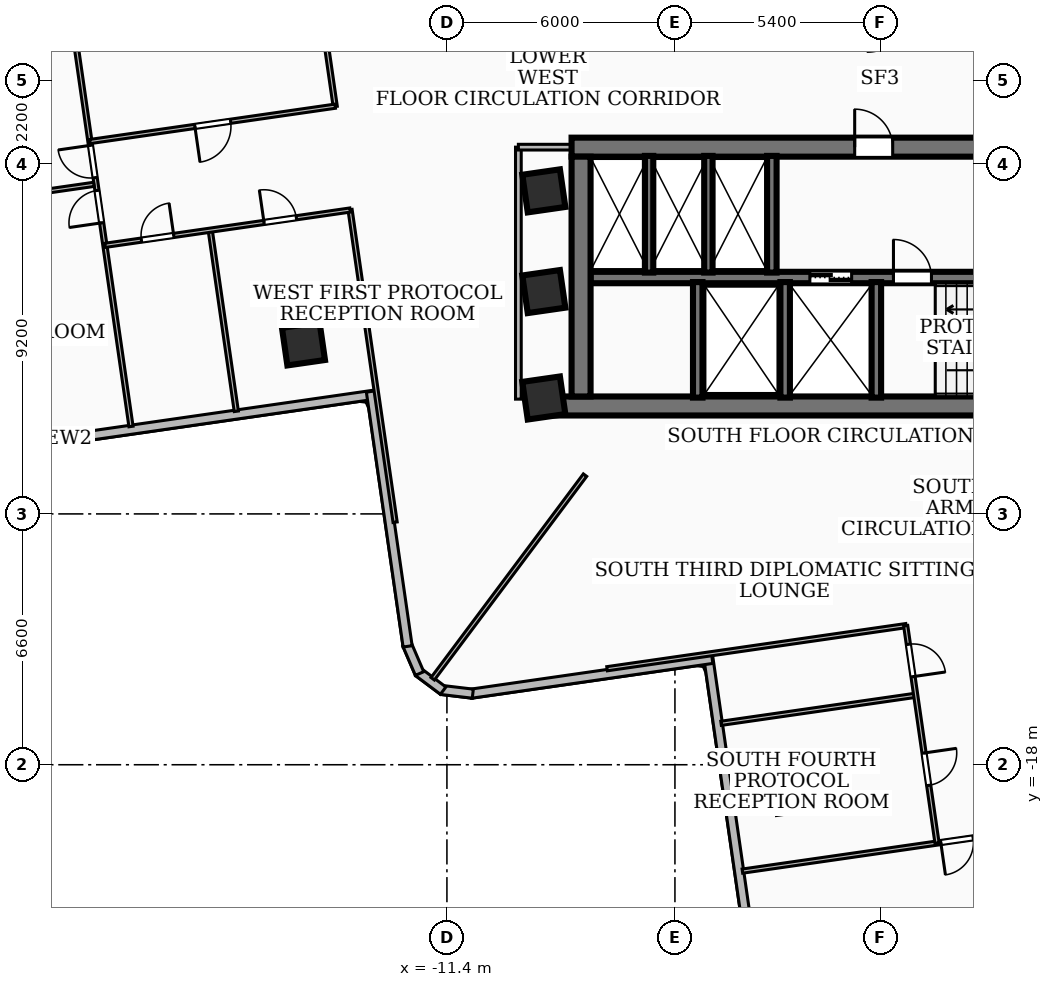
"""IFC4 building model, lengths in metres.
Left out: names, types, materials, properties, quantities, classifications, styles, units other than length and angle.
Written with IfcOpenShell. Run it as: python <this file> out.ifc"""

import sys

from ifc_helpers import new_model, si_unit, direction, frame, frame_2d, origin, origin_2d, place, context, subcontext, project, spatial, rectangle, extrude, element, fill, save


model = new_model("IFC4")
c1 = context("Model", 3, precision=1e-05, world=origin(), true_north=direction((0.0, 1.0)))
c2 = subcontext(c1, "Body", "Model", "MODEL_VIEW")
j1 = project(units=[si_unit("LENGTHUNIT", "METRE"), si_unit("PLANEANGLEUNIT", "RADIAN")], contexts=[c1])
p1 = place(None, origin())
s1 = spatial("IfcSite", under=j1, at=p1, CompositionType="ELEMENT")
p2 = place(p1, origin())
s2 = spatial("IfcBuilding", under=s1, at=p2, CompositionType="ELEMENT")
p3 = place(p2, frame((0.0, 0.0, 89.28)))
s3 = spatial("IfcBuildingStorey", under=s2, at=p3, CompositionType="ELEMENT", Elevation=89.28)
p4 = place(p3, frame((8.78, -8.56, 0.0), z_axis=(0.0, 0.0, 1.0), x_axis=(-1.0, 0.0, 0.0)))
e1 = element("IfcWall", 1, at=p4, inside=s3, PredefinedType="SHEAR", context=c2, shape_type="SweptSolid", body=[
    extrude(rectangle(XDim=17.56, YDim=0.5, at=frame_2d((8.78, 0.0))), origin(), (0.0, 0.0, 1.0), 3.34),
])
p5 = place(p3, frame((-8.12, -1.75, 0.0), z_axis=(0.0, 0.0, 1.0), x_axis=(1.0, 0.0, 0.0)))
e2 = element("IfcWall", 2, at=p5, inside=s3, PredefinedType="SHEAR", context=c2, shape_type="SweptSolid", body=[
    extrude(rectangle(XDim=16.24, YDim=0.5, at=frame_2d((8.12, 0.0))), origin(), (0.0, 0.0, 1.0), 3.34),
])
p6 = place(p5, frame((7.45, 0.0, 0.0)))
e3 = element("IfcOpeningElement", 3, at=p6, cuts=e2, PredefinedType="OPENING", context=c2, shape_type="SweptSolid", body=[
    extrude(rectangle(XDim=1.0, YDim=2.1, at=frame_2d((0.5, 1.05))), frame((0.0, 0.26, 0.0), z_axis=(0.0, -1.0, 0.0), x_axis=(1.0, 0.0, 0.0)), (0.0, 0.0, 1.0), 0.52),
])
p7 = place(p5, frame((10.965, 0.0, 0.0)))
e4 = element("IfcOpeningElement", 4, at=p7, cuts=e2, PredefinedType="OPENING", context=c2, shape_type="SweptSolid", body=[
    extrude(rectangle(XDim=1.05, YDim=2.15, at=frame_2d((0.525, 1.075))), frame((0.0, 0.26, 0.0), z_axis=(0.0, -1.0, 0.0), x_axis=(1.0, 0.0, 0.0)), (0.0, 0.0, 1.0), 0.52),
])
p8 = place(p5, frame((12.525, 0.0, 0.0)))
e5 = element("IfcOpeningElement", 5, at=p8, cuts=e2, PredefinedType="OPENING", context=c2, shape_type="SweptSolid", body=[
    extrude(rectangle(XDim=1.05, YDim=2.15, at=frame_2d((0.525, 1.075))), frame((0.0, 0.26, 0.0), z_axis=(0.0, -1.0, 0.0), x_axis=(1.0, 0.0, 0.0)), (0.0, 0.0, 1.0), 0.52),
])
p9 = place(p5, frame((14.085, 0.0, 0.0)))
e6 = element("IfcOpeningElement", 6, at=p9, cuts=e2, PredefinedType="OPENING", context=c2, shape_type="SweptSolid", body=[
    extrude(rectangle(XDim=1.05, YDim=2.15, at=frame_2d((0.525, 1.075))), frame((0.0, 0.26, 0.0), z_axis=(0.0, -1.0, 0.0), x_axis=(1.0, 0.0, 0.0)), (0.0, 0.0, 1.0), 0.52),
])
p10 = place(p3, frame((-7.87, -8.31, 0.0), z_axis=(0.0, 0.0, 1.0), x_axis=(0.0, 1.0, 0.0)))
e7 = element("IfcWall", 7, at=p10, inside=s3, PredefinedType="SHEAR", context=c2, shape_type="SweptSolid", body=[
    extrude(rectangle(XDim=6.31, YDim=0.5, at=frame_2d((3.155, 0.0))), origin(), (0.0, 0.0, 1.0), 3.34),
])
p11 = place(p3, frame((-7.62, -5.18, 0.0), z_axis=(0.0, 0.0, 1.0), x_axis=(1.0, 0.0, 0.0)))
e8 = element("IfcWall", 8, at=p11, inside=s3, PredefinedType="SOLIDWALL", context=c2, shape_type="SweptSolid", body=[
    extrude(rectangle(XDim=15.24, YDim=0.3, at=frame_2d((7.62, 0.0))), origin(), (0.0, 0.0, 1.0), 3.34),
])
p12 = place(p11, frame((5.77, 0.0, 0.0)))
e9 = element("IfcOpeningElement", 9, at=p12, cuts=e8, PredefinedType="OPENING", context=c2, shape_type="SweptSolid", body=[
    extrude(rectangle(XDim=1.1, YDim=2.15, at=frame_2d((0.55, 1.075))), frame((0.0, 0.16, 0.0), z_axis=(0.0, -1.0, 0.0), x_axis=(1.0, 0.0, 0.0)), (0.0, 0.0, 1.0), 0.32),
])
p13 = place(p11, frame((7.97, 0.0, 0.0)))
e10 = element("IfcOpeningElement", 10, at=p13, cuts=e8, PredefinedType="OPENING", context=c2, shape_type="SweptSolid", body=[
    extrude(rectangle(XDim=1.0, YDim=2.1, at=frame_2d((0.5, 1.05))), frame((0.0, 0.16, 0.0), z_axis=(0.0, -1.0, 0.0), x_axis=(1.0, 0.0, 0.0)), (0.0, 0.0, 1.0), 0.32),
])
for number, where, z_axis, x_axis in (
    (11, (-0.1, -8.34, 0.0), (0.0, 0.0, 1.0), (0.0, 1.0, 0.0)),
    (12, (-2.5, -8.34, 0.0), (0.0, 0.0, 1.0), (0.0, 1.0, 0.0)),
    (13, (-4.8, -8.34, 0.0), (0.0, 0.0, 1.0), (0.0, 1.0, 0.0)),
):
    element("IfcWall", number, at=place(p3, frame(where, z_axis=z_axis, x_axis=x_axis)), inside=s3, PredefinedType="SOLIDWALL", context=c2, shape_type="SweptSolid", body=[
        extrude(rectangle(XDim=3.04, YDim=0.25, at=frame_2d((1.52, 0.0))), origin(), (0.0, 0.0, 1.0), 3.34),
    ])
p14 = place(p3, frame((-2.85, -5.05, 0.0), z_axis=(0.0, 0.0, 1.0), x_axis=(0.0, 1.0, 0.0)))
e14 = element("IfcWall", 14, at=p14, inside=s3, PredefinedType="SOLIDWALL", context=c2, shape_type="SweptSolid", body=[
    extrude(rectangle(XDim=3.07, YDim=0.25, at=frame_2d((1.535, 0.0))), origin(), (0.0, 0.0, 1.0), 3.34),
])
for number, where, z_axis, x_axis in (
    (15, (-6.08, -5.05, 0.0), (0.0, 0.0, 1.0), (0.0, 1.0, 0.0)),
    (16, (-4.52, -5.05, 0.0), (0.0, 0.0, 1.0), (0.0, 1.0, 0.0)),
):
    element("IfcWall", number, at=place(p3, frame(where, z_axis=z_axis, x_axis=x_axis)), inside=s3, PredefinedType="SOLIDWALL", context=c2, shape_type="SweptSolid", body=[
        extrude(rectangle(XDim=3.07, YDim=0.22, at=frame_2d((1.535, 0.0))), origin(), (0.0, 0.0, 1.0), 3.34),
    ])
for number, where, z_axis, x_axis in (
    (17, (-8.85, -5.55, 0.0), (0.0, 0.0, 1.0), (0.99, 0.143, 0.0)),
    (18, (-8.85, -2.9, 0.0), (0.0, 0.0, 1.0), (0.99, 0.143, 0.0)),
    (19, (-8.85, -8.35, 0.0), (0.0, 0.0, 1.0), (0.99, 0.143, 0.0)),
    (20, (-15.175, -6.927, 0.0), (0.0, 0.0, 1.0), (0.99, 0.143, 0.0)),
    (21, (-2.271, -18.724, 0.0), (0.0, 0.0, 1.0), (0.99, 0.143, 0.0)),
):
    element("IfcColumn", number, at=place(p3, frame(where, z_axis=z_axis, x_axis=x_axis)), inside=s3, PredefinedType="COLUMN", context=c2, shape_type="SweptSolid", body=[
        extrude(rectangle(XDim=1.0, YDim=1.0, at=origin_2d()), origin(), (0.0, 0.0, 1.0), 3.6),
    ])
p15 = place(p3, frame((-13.292, -8.26, 0.0), z_axis=(0.0, 0.0, 1.0), x_axis=(-0.989770197797, -0.142670794326, 0.0)))
e22 = element("IfcWall", 22, at=p15, inside=s3, PredefinedType="SOLIDWALL", context=c2, shape_type="SweptSolid", body=[
    extrude(rectangle(XDim=16.275, YDim=0.24, at=frame_2d((8.138, 0.0))), origin(), (0.0, 0.0, 1.0), 2.644),
])
p16 = place(p3, frame((-2.862, -26.691, 0.0), z_axis=(0.0, 0.0, 1.0), x_axis=(-0.142682889326, 0.989768454283, 0.0)))
e23 = element("IfcWall", 23, at=p16, inside=s3, PredefinedType="SOLIDWALL", context=c2, shape_type="SweptSolid", body=[
    extrude(rectangle(XDim=11.676, YDim=0.24, at=frame_2d((5.838, 0.0))), origin(), (0.0, 0.0, 1.0), 2.486),
])
p17 = place(p3, frame((-4.419, -15.215, 0.0), z_axis=(0.0, 0.0, 1.0), x_axis=(-0.989755260243, -0.14277438433, 0.0)))
e24 = element("IfcWall", 24, at=p17, inside=s3, PredefinedType="SOLIDWALL", context=c2, shape_type="SweptSolid", body=[
    extrude(rectangle(XDim=6.416, YDim=0.24, at=frame_2d((3.208, 0.0))), origin(), (0.0, 0.0, 1.0), 2.486),
])
p18 = place(p3, frame((-10.719, -16.13, 0.0), z_axis=(0.0, 0.0, 1.0), x_axis=(-0.993031739051, 0.117847211411, 0.0)))
e25 = element("IfcWall", 25, at=p18, inside=s3, PredefinedType="SOLIDWALL", context=c2, shape_type="SweptSolid", body=[
    extrude(rectangle(XDim=0.831, YDim=0.24, at=frame_2d((0.416, 0.0))), origin(), (0.0, 0.0, 1.0), 3.34),
])
p19 = place(p3, frame((-11.499, -16.05, 0.0), z_axis=(0.0, 0.0, 1.0), x_axis=(-0.800072018724, 0.599903963027, 0.0)))
e26 = element("IfcWall", 26, at=p19, inside=s3, PredefinedType="SOLIDWALL", context=c2, shape_type="SweptSolid", body=[
    extrude(rectangle(XDim=0.813, YDim=0.24, at=frame_2d((0.407, 0.0))), origin(), (0.0, 0.0, 1.0), 3.34),
])
p20 = place(p3, frame((-12.12, -15.6, 0.0), z_axis=(0.0, 0.0, 1.0), x_axis=(-0.394735025731, 0.918795004047, 0.0)))
e27 = element("IfcWall", 27, at=p20, inside=s3, PredefinedType="SOLIDWALL", context=c2, shape_type="SweptSolid", body=[
    extrude(rectangle(XDim=0.831, YDim=0.24, at=frame_2d((0.415, 0.0))), origin(), (0.0, 0.0, 1.0), 3.34),
])
p21 = place(p3, frame((-12.434, -14.885, 0.0), z_axis=(0.0, 0.0, 1.0), x_axis=(-0.142692500085, 0.989767068769, 0.0)))
e28 = element("IfcWall", 28, at=p21, inside=s3, PredefinedType="SOLIDWALL", context=c2, shape_type="SweptSolid", body=[
    extrude(rectangle(XDim=6.775, YDim=0.24, at=frame_2d((3.388, 0.0))), origin(), (0.0, 0.0, 1.0), 2.644),
])
p22 = place(p3, frame((-9.52, -8.38, 0.0), z_axis=(0.0, 0.0, 1.0), x_axis=(0.0, 1.0, 0.0)))
e29 = element("IfcWall", 29, at=p22, inside=s3, PredefinedType="PARTITIONING", context=c2, shape_type="SweptSolid", body=[
    extrude(rectangle(XDim=6.63, YDim=0.15, at=frame_2d((3.315, 0.0))), origin(), (0.0, 0.0, 1.0), 2.486),
])
p23 = place(p3, frame((-7.85, -1.75, 0.0), z_axis=(0.0, 0.0, 1.0), x_axis=(-1.0, 0.0, 0.0)))
e30 = element("IfcWall", 30, at=p23, inside=s3, PredefinedType="PARTITIONING", context=c2, shape_type="SweptSolid", body=[
    extrude(rectangle(XDim=1.67, YDim=0.15, at=frame_2d((0.835, 0.0))), origin(), (0.0, 0.0, 1.0), 2.405),
])
p24 = place(p3, frame((-7.766, -10.38, 0.0), z_axis=(0.0, 0.0, 1.0), x_axis=(-0.598966195252, -0.800774310867, 0.0)))
e31 = element("IfcWall", 31, at=p24, inside=s3, PredefinedType="PARTITIONING", context=c2, shape_type="SweptSolid", body=[
    extrude(rectangle(XDim=6.691, YDim=0.11, at=frame_2d((3.346, 0.0))), origin(), (0.0, 0.0, 1.0), 2.644),
])
p25 = place(p3, frame((-13.949, -3.394, 0.0), z_axis=(0.0, 0.0, 1.0), x_axis=(0.142725091033, -0.989762369657, 0.0)))
e32 = element("IfcWall", 32, at=p25, inside=s3, PredefinedType="PARTITIONING", context=c2, shape_type="SweptSolid", body=[
    extrude(rectangle(XDim=8.31, YDim=0.11, at=frame_2d((4.155, 0.0))), origin(), (0.0, 0.0, 1.0), 2.486),
])
p26 = place(p3, frame((-15.474, 7.186, 0.0), z_axis=(0.0, 0.0, 1.0), x_axis=(0.142779920322, -0.989754461648, 0.0)))
e33 = element("IfcWall", 33, at=p26, inside=s3, PredefinedType="PARTITIONING", context=c2, shape_type="SweptSolid", body=[
    extrude(rectangle(XDim=7.949, YDim=0.11, at=frame_2d((3.975, 0.0))), origin(), (0.0, 0.0, 1.0), 2.486),
])
p27 = place(p3, frame((-17.626, -3.954, 0.0), z_axis=(0.0, 0.0, 1.0), x_axis=(0.142668704072, -0.989770499095, 0.0)))
e34 = element("IfcWall", 34, at=p27, inside=s3, PredefinedType="PARTITIONING", context=c2, shape_type="SweptSolid", body=[
    extrude(rectangle(XDim=4.795, YDim=0.11, at=frame_2d((2.397, 0.0))), origin(), (0.0, 0.0, 1.0), 2.486),
])
p28 = place(p3, frame((-20.4, -4.334, 0.0), z_axis=(0.0, 0.0, 1.0), x_axis=(0.989774990044, 0.142637544439, 0.0)))
e35 = element("IfcWall", 35, at=p28, inside=s3, PredefinedType="PARTITIONING", context=c2, shape_type="SweptSolid", body=[
    extrude(rectangle(XDim=6.52, YDim=0.11, at=frame_2d((3.26, 0.0))), origin(), (0.0, 0.0, 1.0), 3.34),
])
p29 = place(p28, frame((4.23, 0.0, 0.0)))
e36 = element("IfcOpeningElement", 36, at=p29, cuts=e35, PredefinedType="OPENING", context=c2, shape_type="SweptSolid", body=[
    extrude(rectangle(XDim=0.86, YDim=2.04, at=frame_2d((0.43, 1.02))), frame((0.0, 0.065, 0.0), z_axis=(0.0, -1.0, 0.0), x_axis=(1.0, 0.0, 0.0)), (0.0, 0.0, 1.0), 0.13),
])
p30 = place(p28, frame((0.97, 0.0, 0.0)))
e37 = element("IfcOpeningElement", 37, at=p30, cuts=e35, PredefinedType="OPENING", context=c2, shape_type="SweptSolid", body=[
    extrude(rectangle(XDim=0.86, YDim=2.04, at=frame_2d((0.43, 1.02))), frame((0.0, 0.065, 0.0), z_axis=(0.0, -1.0, 0.0), x_axis=(1.0, 0.0, 0.0)), (0.0, 0.0, 1.0), 0.13),
])
p31 = place(p3, frame((-14.341, -0.672, 0.0), z_axis=(0.0, 0.0, 1.0), x_axis=(-0.989774990044, -0.142637544439, 0.0)))
e38 = element("IfcWall", 38, at=p31, inside=s3, PredefinedType="PARTITIONING", context=c2, shape_type="SweptSolid", body=[
    extrude(rectangle(XDim=6.52, YDim=0.11, at=frame_2d((3.26, 0.0))), origin(), (0.0, 0.0, 1.0), 3.34),
])
p32 = place(p31, frame((2.78, 0.0, 0.0)))
e39 = element("IfcOpeningElement", 39, at=p32, cuts=e38, PredefinedType="OPENING", context=c2, shape_type="SweptSolid", body=[
    extrude(rectangle(XDim=0.95, YDim=2.08, at=frame_2d((0.475, 1.04))), frame((0.0, 0.065, 0.0), z_axis=(0.0, -1.0, 0.0), x_axis=(1.0, 0.0, 0.0)), (0.0, 0.0, 1.0), 0.13),
])
p33 = place(p3, frame((-20.692, -2.729, 0.0), z_axis=(0.0, 0.0, 1.0), x_axis=(-0.989773607841, -0.14264713534, 0.0)))
e40 = element("IfcWall", 40, at=p33, inside=s3, PredefinedType="PARTITIONING", context=c2, shape_type="SweptSolid", body=[
    extrude(rectangle(XDim=11.125, YDim=0.11, at=frame_2d((5.562, 0.0))), origin(), (0.0, 0.0, 1.0), 2.832),
])
p34 = place(p3, frame((-19.713, -9.1, 0.0), z_axis=(0.0, 0.0, 1.0), x_axis=(-0.142667743944, 0.98977063749, 0.0)))
e41 = element("IfcWall", 41, at=p34, inside=s3, PredefinedType="PARTITIONING", context=c2, shape_type="SweptSolid", body=[
    extrude(rectangle(XDim=12.75, YDim=0.11, at=frame_2d((6.375, 0.0))), origin(), (0.0, 0.0, 1.0), 2.486),
])
p35 = place(p34, frame((6.615, 0.0, 0.0)))
e42 = element("IfcOpeningElement", 42, at=p35, cuts=e41, PredefinedType="OPENING", context=c2, shape_type="SweptSolid", body=[
    extrude(rectangle(XDim=0.86, YDim=2.04, at=frame_2d((0.43, 1.02))), frame((0.0, 0.065, 0.0), z_axis=(0.0, -1.0, 0.0), x_axis=(1.0, 0.0, 0.0)), (0.0, 0.0, 1.0), 0.13),
])
p36 = place(p34, frame((5.414, 0.0, 0.0)))
e43 = element("IfcOpeningElement", 43, at=p36, cuts=e41, PredefinedType="OPENING", context=c2, shape_type="SweptSolid", body=[
    extrude(rectangle(XDim=0.86, YDim=2.04, at=frame_2d((0.43, 1.02))), frame((0.0, 0.065, 0.0), z_axis=(0.0, -1.0, 0.0), x_axis=(1.0, 0.0, 0.0)), (0.0, 0.0, 1.0), 0.13),
])
p37 = place(p3, frame((-7.186, -15.474, 0.0), z_axis=(0.0, 0.0, 1.0), x_axis=(0.989754461648, 0.142779920322, 0.0)))
e44 = element("IfcWall", 44, at=p37, inside=s3, PredefinedType="PARTITIONING", context=c2, shape_type="SweptSolid", body=[
    extrude(rectangle(XDim=7.949, YDim=0.11, at=frame_2d((3.975, 0.0))), origin(), (0.0, 0.0, 1.0), 2.486),
])
p38 = place(p3, frame((-4.186, -16.91, 0.0), z_axis=(0.0, 0.0, 1.0), x_axis=(0.989785908973, 0.142561756436, 0.0)))
e45 = element("IfcWall", 45, at=p38, inside=s3, PredefinedType="PARTITIONING", context=c2, shape_type="SweptSolid", body=[
    extrude(rectangle(XDim=5.155, YDim=0.11, at=frame_2d((2.577, 0.0))), origin(), (0.0, 0.0, 1.0), 2.486),
])
p39 = place(p3, frame((0.672, -14.341, 0.0), z_axis=(0.0, 0.0, 1.0), x_axis=(0.142722164178, -0.989762791709, 0.0)))
e46 = element("IfcWall", 46, at=p39, inside=s3, PredefinedType="PARTITIONING", context=c2, shape_type="SweptSolid", body=[
    extrude(rectangle(XDim=5.78, YDim=0.11, at=frame_2d((2.89, 0.0))), origin(), (0.0, 0.0, 1.0), 3.34),
])
p40 = place(p39, frame((0.495, 0.0, 0.0)))
e47 = element("IfcOpeningElement", 47, at=p40, cuts=e46, PredefinedType="OPENING", context=c2, shape_type="SweptSolid", body=[
    extrude(rectangle(XDim=0.86, YDim=2.04, at=frame_2d((0.43, 1.02))), frame((0.0, 0.065, 0.0), z_axis=(0.0, -1.0, 0.0), x_axis=(1.0, 0.0, 0.0)), (0.0, 0.0, 1.0), 0.13),
])
p41 = place(p39, frame((3.385, 0.0, 0.0)))
e48 = element("IfcOpeningElement", 48, at=p41, cuts=e46, PredefinedType="OPENING", context=c2, shape_type="SweptSolid", body=[
    extrude(rectangle(XDim=0.86, YDim=2.04, at=frame_2d((0.43, 1.02))), frame((0.0, 0.065, 0.0), z_axis=(0.0, -1.0, 0.0), x_axis=(1.0, 0.0, 0.0)), (0.0, 0.0, 1.0), 0.13),
])
p42 = place(p3, frame((8.994, -18.981, 0.0), z_axis=(0.0, 0.0, 1.0), x_axis=(-0.989779502996, -0.14260622514, 0.0)))
e49 = element("IfcWall", 49, at=p42, inside=s3, PredefinedType="PARTITIONING", context=c2, shape_type="SweptSolid", body=[
    extrude(rectangle(XDim=12.749, YDim=0.11, at=frame_2d((6.375, 0.0))), origin(), (0.0, 0.0, 1.0), 2.486),
])
p43 = place(p42, frame((6.615, 0.0, 0.0)))
e50 = element("IfcOpeningElement", 50, at=p43, cuts=e49, PredefinedType="OPENING", context=c2, shape_type="SweptSolid", body=[
    extrude(rectangle(XDim=0.86, YDim=2.04, at=frame_2d((0.43, 1.02))), frame((0.0, 0.065, 0.0), z_axis=(0.0, -1.0, 0.0), x_axis=(1.0, 0.0, 0.0)), (0.0, 0.0, 1.0), 0.13),
])
p44 = place(p42, frame((5.415, 0.0, 0.0)))
e51 = element("IfcOpeningElement", 51, at=p44, cuts=e49, PredefinedType="OPENING", context=c2, shape_type="SweptSolid", body=[
    extrude(rectangle(XDim=0.86, YDim=2.04, at=frame_2d((0.43, 1.02))), frame((0.0, 0.065, 0.0), z_axis=(0.0, -1.0, 0.0), x_axis=(1.0, 0.0, 0.0)), (0.0, 0.0, 1.0), 0.13),
])
p45 = place(p6, origin())
e52 = element("IfcDoor", 52, at=p45, inside=s3, OperationType="SINGLE_SWING_LEFT", PredefinedType="DOOR", context=c2, shape_type="SweptSolid", body=[
    extrude(rectangle(XDim=1.0, YDim=2.1, at=frame_2d((0.5, 1.05))), frame((0.0, 0.025, 0.0), z_axis=(0.0, -1.0, 0.0), x_axis=(1.0, 0.0, 0.0)), (0.0, 0.0, 1.0), 0.05),
])
fill(e3, e52)
p46 = place(p12, origin())
e53 = element("IfcDoor", 53, at=p46, inside=s3, OperationType="DOUBLE_DOOR_SLIDING", PredefinedType="DOOR", context=c2, shape_type="SweptSolid", body=[
    extrude(rectangle(XDim=1.1, YDim=2.15, at=frame_2d((0.55, 1.075))), frame((0.0, 0.025, 0.0), z_axis=(0.0, -1.0, 0.0), x_axis=(1.0, 0.0, 0.0)), (0.0, 0.0, 1.0), 0.05),
])
fill(e9, e53)
p47 = place(p13, origin())
e54 = element("IfcDoor", 54, at=p47, inside=s3, OperationType="SINGLE_SWING_LEFT", PredefinedType="DOOR", context=c2, shape_type="SweptSolid", body=[
    extrude(rectangle(XDim=1.0, YDim=2.1, at=frame_2d((0.5, 1.05))), frame((0.0, 0.025, 0.0), z_axis=(0.0, -1.0, 0.0), x_axis=(1.0, 0.0, 0.0)), (0.0, 0.0, 1.0), 0.05),
])
fill(e10, e54)
p48 = place(p29, origin())
e55 = element("IfcDoor", 55, at=p48, inside=s3, OperationType="SINGLE_SWING_LEFT", PredefinedType="DOOR", context=c2, shape_type="SweptSolid", body=[
    extrude(rectangle(XDim=0.86, YDim=2.04, at=frame_2d((0.43, 1.02))), frame((0.0, 0.025, 0.0), z_axis=(0.0, -1.0, 0.0), x_axis=(1.0, 0.0, 0.0)), (0.0, 0.0, 1.0), 0.05),
])
fill(e36, e55)
p49 = place(p30, origin())
e56 = element("IfcDoor", 56, at=p49, inside=s3, OperationType="SINGLE_SWING_RIGHT", PredefinedType="DOOR", context=c2, shape_type="SweptSolid", body=[
    extrude(rectangle(XDim=0.86, YDim=2.04, at=frame_2d((0.43, 1.02))), frame((0.0, 0.025, 0.0), z_axis=(0.0, -1.0, 0.0), x_axis=(1.0, 0.0, 0.0)), (0.0, 0.0, 1.0), 0.05),
])
fill(e37, e56)
p50 = place(p32, origin())
e57 = element("IfcDoor", 57, at=p50, inside=s3, OperationType="SINGLE_SWING_RIGHT", PredefinedType="DOOR", context=c2, shape_type="SweptSolid", body=[
    extrude(rectangle(XDim=0.95, YDim=2.08, at=frame_2d((0.475, 1.04))), frame((0.0, 0.025, 0.0), z_axis=(0.0, -1.0, 0.0), x_axis=(1.0, 0.0, 0.0)), (0.0, 0.0, 1.0), 0.05),
])
fill(e39, e57)
p51 = place(p35, origin())
e58 = element("IfcDoor", 58, at=p51, inside=s3, OperationType="SINGLE_SWING_RIGHT", PredefinedType="DOOR", context=c2, shape_type="SweptSolid", body=[
    extrude(rectangle(XDim=0.86, YDim=2.04, at=frame_2d((0.43, 1.02))), frame((0.0, 0.025, 0.0), z_axis=(0.0, -1.0, 0.0), x_axis=(1.0, 0.0, 0.0)), (0.0, 0.0, 1.0), 0.05),
])
fill(e42, e58)
p52 = place(p36, origin())
e59 = element("IfcDoor", 59, at=p52, inside=s3, OperationType="SINGLE_SWING_LEFT", PredefinedType="DOOR", context=c2, shape_type="SweptSolid", body=[
    extrude(rectangle(XDim=0.86, YDim=2.04, at=frame_2d((0.43, 1.02))), frame((0.0, 0.025, 0.0), z_axis=(0.0, -1.0, 0.0), x_axis=(1.0, 0.0, 0.0)), (0.0, 0.0, 1.0), 0.05),
])
fill(e43, e59)
p53 = place(p40, origin())
e60 = element("IfcDoor", 60, at=p53, inside=s3, OperationType="SINGLE_SWING_RIGHT", PredefinedType="DOOR", context=c2, shape_type="SweptSolid", body=[
    extrude(rectangle(XDim=0.86, YDim=2.04, at=frame_2d((0.43, 1.02))), frame((0.0, 0.025, 0.0), z_axis=(0.0, -1.0, 0.0), x_axis=(1.0, 0.0, 0.0)), (0.0, 0.0, 1.0), 0.05),
])
fill(e47, e60)
p54 = place(p41, origin())
e61 = element("IfcDoor", 61, at=p54, inside=s3, OperationType="SINGLE_SWING_LEFT", PredefinedType="DOOR", context=c2, shape_type="SweptSolid", body=[
    extrude(rectangle(XDim=0.86, YDim=2.04, at=frame_2d((0.43, 1.02))), frame((0.0, 0.025, 0.0), z_axis=(0.0, -1.0, 0.0), x_axis=(1.0, 0.0, 0.0)), (0.0, 0.0, 1.0), 0.05),
])
fill(e48, e61)
p55 = place(p43, origin())
e62 = element("IfcDoor", 62, at=p55, inside=s3, OperationType="SINGLE_SWING_RIGHT", PredefinedType="DOOR", context=c2, shape_type="SweptSolid", body=[
    extrude(rectangle(XDim=0.86, YDim=2.04, at=frame_2d((0.43, 1.02))), frame((0.0, 0.025, 0.0), z_axis=(0.0, -1.0, 0.0), x_axis=(1.0, 0.0, 0.0)), (0.0, 0.0, 1.0), 0.05),
])
fill(e50, e62)
save(model, sys.argv[1])
